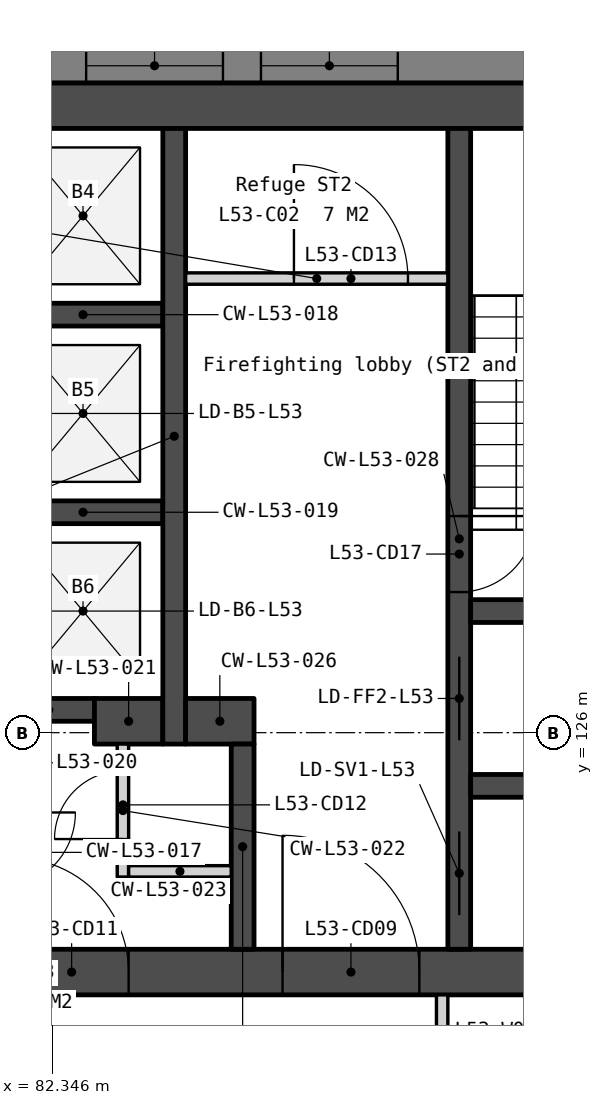
"""IFC4 building model, lengths in metres.
Left out: names, types, materials, properties, quantities, classifications, styles, units other than length and angle.
Written with IfcOpenShell. Run it as: python <this file> out.ifc"""

import sys

from ifc_helpers import new_model, si_unit, direction, frame, frame_2d, origin, place, context, subcontext, project, spatial, polyline, rectangle, outline, extrude, element, fill, save


model = new_model("IFC4")
c1 = context("Model", 3, precision=1e-05, world=origin(), true_north=direction((0.0, 1.0)))
c2 = subcontext(c1, "Body", "Model", "MODEL_VIEW")
j1 = project(units=[si_unit("LENGTHUNIT", "METRE"), si_unit("PLANEANGLEUNIT", "RADIAN")], contexts=[c1])
p1 = place(None, origin())
s1 = spatial("IfcSite", under=j1, at=p1, CompositionType="ELEMENT")
p2 = place(p1, origin())
s2 = spatial("IfcBuilding", under=s1, at=p2, CompositionType="ELEMENT")
p3 = place(p2, frame((0.0, 0.0, 211.4)))
s3 = spatial("IfcBuildingStorey", under=s2, at=p3, CompositionType="ELEMENT", Elevation=211.4)
p4 = place(p3, frame((69.0, 134.25, 0.0), z_axis=(0.0, 0.0, 1.0), x_axis=(1.0, 0.0, 0.0)))
e1 = element("IfcWall", 1, at=p4, inside=s3, PredefinedType="SOLIDWALL", context=c2, shape_type="SweptSolid", body=[
    extrude(rectangle(XDim=22.0, YDim=0.6, at=frame_2d((11.0, 0.0))), origin(), (0.0, 0.0, 1.0), 3.75),
])
p5 = place(p3, frame((69.0, 122.85, 0.0), z_axis=(0.0, 0.0, 1.0), x_axis=(1.0, 0.0, 0.0)))
e2 = element("IfcWall", 2, at=p5, inside=s3, PredefinedType="SOLIDWALL", context=c2, shape_type="SweptSolid", body=[
    extrude(rectangle(XDim=22.0, YDim=0.6, at=frame_2d((11.0, 0.0))), origin(), (0.0, 0.0, 1.0), 3.75),
])
p6 = place(p5, frame((16.375, 0.0, 0.0)))
e3 = element("IfcOpeningElement", 3, at=p6, cuts=e2, PredefinedType="OPENING", context=c2, shape_type="SweptSolid", body=[
    extrude(rectangle(XDim=1.8, YDim=2.1, at=frame_2d((0.9, 1.05))), frame((0.0, 0.31, 0.0), z_axis=(0.0, -1.0, 0.0), x_axis=(1.0, 0.0, 0.0)), (0.0, 0.0, 1.0), 0.62),
])
p7 = place(p5, frame((3.825, 0.0, 0.0)))
e4 = element("IfcOpeningElement", 4, at=p7, cuts=e2, PredefinedType="OPENING", context=c2, shape_type="SweptSolid", body=[
    extrude(rectangle(XDim=1.8, YDim=2.1, at=frame_2d((0.9, 1.05))), frame((0.0, 0.31, 0.0), z_axis=(0.0, -1.0, 0.0), x_axis=(1.0, 0.0, 0.0)), (0.0, 0.0, 1.0), 0.62),
])
p8 = place(p5, frame((12.85, 0.0, 0.0)))
e5 = element("IfcOpeningElement", 5, at=p8, cuts=e2, PredefinedType="OPENING", context=c2, shape_type="SweptSolid", body=[
    extrude(rectangle(XDim=1.5, YDim=2.1, at=frame_2d((0.75, 1.05))), frame((0.0, 0.31, 0.0), z_axis=(0.0, -1.0, 0.0), x_axis=(1.0, 0.0, 0.0)), (0.0, 0.0, 1.0), 0.62),
])
for number, where, z_axis, x_axis in (
    (6, (81.7, 131.5, 0.0), (0.0, 0.0, 1.0), (1.0, 0.0, 0.0)),
    (7, (81.7, 128.9, 0.0), (0.0, 0.0, 1.0), (1.0, 0.0, 0.0)),
):
    element("IfcWall", number, at=place(p3, frame(where, z_axis=z_axis, x_axis=x_axis)), inside=s3, PredefinedType="SOLIDWALL", context=c2, shape_type="SweptSolid", body=[
        extrude(rectangle(XDim=2.1, YDim=0.3, at=frame_2d((1.05, 0.0))), origin(), (0.0, 0.0, 1.0), 3.75),
    ])
p9 = place(p3, frame((81.7, 126.3, 0.0), z_axis=(0.0, 0.0, 1.0), x_axis=(1.0, 0.0, 0.0)))
e8 = element("IfcWall", 8, at=p9, inside=s3, PredefinedType="SOLIDWALL", context=c2, shape_type="SweptSolid", body=[
    extrude(rectangle(XDim=1.2, YDim=0.3, at=frame_2d((0.6, 0.0))), origin(), (0.0, 0.0, 1.0), 3.75),
])
p10 = place(p3, frame((82.9, 126.15, 0.0), z_axis=(0.0, 0.0, 1.0), x_axis=(1.0, 0.0, 0.0)))
e9 = element("IfcWall", 9, at=p10, inside=s3, PredefinedType="SOLIDWALL", context=c2, shape_type="SweptSolid", body=[
    extrude(rectangle(XDim=0.9, YDim=0.6, at=frame_2d((0.45, 0.0))), origin(), (0.0, 0.0, 1.0), 3.75),
])
p11 = place(p3, frame((83.275, 125.85, 0.0), z_axis=(0.0, 0.0, 1.0), x_axis=(0.0, -1.0, 0.0)))
e10 = element("IfcWall", 10, at=p11, inside=s3, PredefinedType="PARTITIONING", context=c2, shape_type="SweptSolid", body=[
    extrude(rectangle(XDim=1.75, YDim=0.15, at=frame_2d((0.875, 0.0))), origin(), (0.0, 0.0, 1.0), 3.75),
])
p12 = place(p11, frame((0.35, 0.0, 0.0)))
e11 = element("IfcOpeningElement", 11, at=p12, cuts=e10, PredefinedType="OPENING", context=c2, shape_type="SweptSolid", body=[
    extrude(rectangle(XDim=0.9, YDim=2.1, at=frame_2d((0.45, 1.05))), frame((0.0, 0.085, 0.0), z_axis=(0.0, -1.0, 0.0), x_axis=(1.0, 0.0, 0.0)), (0.0, 0.0, 1.0), 0.17),
])
p13 = place(p3, frame((83.35, 124.175, 0.0), z_axis=(0.0, 0.0, 1.0), x_axis=(1.0, 0.0, 0.0)))
e12 = element("IfcWall", 12, at=p13, inside=s3, PredefinedType="PARTITIONING", context=c2, shape_type="SweptSolid", body=[
    extrude(rectangle(XDim=1.35, YDim=0.15, at=frame_2d((0.675, 0.0))), origin(), (0.0, 0.0, 1.0), 3.75),
])
p14 = place(p3, frame((83.95, 133.95, 0.0), z_axis=(0.0, 0.0, 1.0), x_axis=(0.0, -1.0, 0.0)))
e13 = element("IfcWall", 13, at=p14, inside=s3, PredefinedType="SOLIDWALL", context=c2, shape_type="SweptSolid", body=[
    extrude(rectangle(XDim=8.1, YDim=0.3, at=frame_2d((4.05, 0.0))), origin(), (0.0, 0.0, 1.0), 3.75),
])
p15 = place(p3, frame((84.1, 131.975, 0.0), z_axis=(0.0, 0.0, 1.0), x_axis=(1.0, 0.0, 0.0)))
e14 = element("IfcWall", 14, at=p15, inside=s3, PredefinedType="PARTITIONING", context=c2, shape_type="SweptSolid", body=[
    extrude(rectangle(XDim=3.45, YDim=0.15, at=frame_2d((1.725, 0.0))), origin(), (0.0, 0.0, 1.0), 3.75),
])
p16 = place(p15, frame((1.425, 0.0, 0.0)))
e15 = element("IfcOpeningElement", 15, at=p16, cuts=e14, PredefinedType="OPENING", context=c2, shape_type="SweptSolid", body=[
    extrude(rectangle(XDim=1.5, YDim=2.1, at=frame_2d((0.75, 1.05))), frame((0.0, 0.085, 0.0), z_axis=(0.0, -1.0, 0.0), x_axis=(1.0, 0.0, 0.0)), (0.0, 0.0, 1.0), 0.17),
])
p17 = place(p3, frame((84.1, 126.15, 0.0), z_axis=(0.0, 0.0, 1.0), x_axis=(1.0, 0.0, 0.0)))
e16 = element("IfcWall", 16, at=p17, inside=s3, PredefinedType="SOLIDWALL", context=c2, shape_type="SweptSolid", body=[
    extrude(rectangle(XDim=0.9, YDim=0.6, at=frame_2d((0.45, 0.0))), origin(), (0.0, 0.0, 1.0), 3.75),
])
p18 = place(p3, frame((84.85, 125.85, 0.0), z_axis=(0.0, 0.0, 1.0), x_axis=(0.0, -1.0, 0.0)))
e17 = element("IfcWall", 17, at=p18, inside=s3, PredefinedType="SOLIDWALL", context=c2, shape_type="SweptSolid", body=[
    extrude(rectangle(XDim=2.7, YDim=0.3, at=frame_2d((1.35, 0.0))), origin(), (0.0, 0.0, 1.0), 3.75),
])
p19 = place(p3, frame((87.7, 133.95, 0.0), z_axis=(0.0, 0.0, 1.0), x_axis=(0.0, -1.0, 0.0)))
e18 = element("IfcWall", 18, at=p19, inside=s3, PredefinedType="SOLIDWALL", context=c2, shape_type="SweptSolid", body=[
    extrude(rectangle(XDim=10.8, YDim=0.3, at=frame_2d((5.4, 0.0))), origin(), (0.0, 0.0, 1.0), 3.75),
])
p20 = place(p19, frame((6.95, 0.0, 0.0)))
e19 = element("IfcOpeningElement", 19, at=p20, cuts=e18, PredefinedType="OPENING", context=c2, shape_type="SweptSolid", body=[
    extrude(rectangle(XDim=1.1, YDim=2.1, at=frame_2d((0.55, 1.05))), frame((0.0, 0.16, 0.0), z_axis=(0.0, -1.0, 0.0), x_axis=(1.0, 0.0, 0.0)), (0.0, 0.0, 1.0), 0.32),
])
p21 = place(p19, frame((5.1, 0.0, 0.0)))
e20 = element("IfcOpeningElement", 20, at=p21, cuts=e18, PredefinedType="OPENING", context=c2, shape_type="SweptSolid", body=[
    extrude(rectangle(XDim=1.0, YDim=2.1, at=frame_2d((0.5, 1.05))), frame((0.0, 0.16, 0.0), z_axis=(0.0, -1.0, 0.0), x_axis=(1.0, 0.0, 0.0)), (0.0, 0.0, 1.0), 0.32),
])
p22 = place(p19, frame((9.25, 0.0, 0.0)))
e21 = element("IfcOpeningElement", 21, at=p22, cuts=e18, PredefinedType="OPENING", context=c2, shape_type="SweptSolid", body=[
    extrude(rectangle(XDim=1.1, YDim=2.1, at=frame_2d((0.55, 1.05))), frame((0.0, 0.16, 0.0), z_axis=(0.0, -1.0, 0.0), x_axis=(1.0, 0.0, 0.0)), (0.0, 0.0, 1.0), 0.32),
])
for number, where, z_axis, x_axis in (
    (22, (87.85, 127.6, 0.0), (0.0, 0.0, 1.0), (1.0, 0.0, 0.0)),
    (23, (87.85, 125.3, 0.0), (0.0, 0.0, 1.0), (1.0, 0.0, 0.0)),
):
    element("IfcWall", number, at=place(p3, frame(where, z_axis=z_axis, x_axis=x_axis)), inside=s3, PredefinedType="SOLIDWALL", context=c2, shape_type="SweptSolid", body=[
        extrude(rectangle(XDim=2.55, YDim=0.3, at=frame_2d((1.275, 0.0))), origin(), (0.0, 0.0, 1.0), 3.75),
    ])
p23 = place(p3, frame((99.365, 134.775, -0.15), z_axis=(0.0, 0.0, 1.0), x_axis=(-1.0, 0.0, 0.0)))
e24 = element("IfcWall", 24, at=p23, inside=s3, PredefinedType="SOLIDWALL", context=c2, shape_type="SweptSolid", body=[
    extrude(outline(polyline([(38.729, 0.0), (38.729, 3.9), (0.0, 3.9), (0.0, 0.0), (38.729, 0.0)])), frame((0.0, 0.225, 0.0), z_axis=(0.0, -1.0, 0.0), x_axis=(1.0, 0.0, 0.0)), (0.0, 0.0, 1.0), 0.45),
])
p24 = place(p23, frame((2.791, 0.0, 0.95)))
e25 = element("IfcOpeningElement", 25, at=p24, cuts=e24, PredefinedType="OPENING", context=c2, shape_type="SweptSolid", body=[
    extrude(rectangle(XDim=1.8, YDim=2.2, at=frame_2d((0.9, 1.1))), frame((0.0, 0.235, 0.0), z_axis=(0.0, -1.0, 0.0), x_axis=(1.0, 0.0, 0.0)), (0.0, 0.0, 1.0), 0.47),
])
p25 = place(p23, frame((5.091, 0.0, 0.95)))
e26 = element("IfcOpeningElement", 26, at=p25, cuts=e24, PredefinedType="OPENING", context=c2, shape_type="SweptSolid", body=[
    extrude(rectangle(XDim=1.8, YDim=2.2, at=frame_2d((0.9, 1.1))), frame((0.0, 0.235, 0.0), z_axis=(0.0, -1.0, 0.0), x_axis=(1.0, 0.0, 0.0)), (0.0, 0.0, 1.0), 0.47),
])
p26 = place(p23, frame((12.473, 0.0, 0.95)))
e27 = element("IfcOpeningElement", 27, at=p26, cuts=e24, PredefinedType="OPENING", context=c2, shape_type="SweptSolid", body=[
    extrude(rectangle(XDim=1.8, YDim=2.2, at=frame_2d((0.9, 1.1))), frame((0.0, 0.235, 0.0), z_axis=(0.0, -1.0, 0.0), x_axis=(1.0, 0.0, 0.0)), (0.0, 0.0, 1.0), 0.47),
])
p27 = place(p23, frame((14.773, 0.0, 0.95)))
e28 = element("IfcOpeningElement", 28, at=p27, cuts=e24, PredefinedType="OPENING", context=c2, shape_type="SweptSolid", body=[
    extrude(rectangle(XDim=1.8, YDim=2.2, at=frame_2d((0.9, 1.1))), frame((0.0, 0.235, 0.0), z_axis=(0.0, -1.0, 0.0), x_axis=(1.0, 0.0, 0.0)), (0.0, 0.0, 1.0), 0.47),
])
p28 = place(p23, frame((22.156, 0.0, 0.95)))
e29 = element("IfcOpeningElement", 29, at=p28, cuts=e24, PredefinedType="OPENING", context=c2, shape_type="SweptSolid", body=[
    extrude(rectangle(XDim=1.8, YDim=2.2, at=frame_2d((0.9, 1.1))), frame((0.0, 0.235, 0.0), z_axis=(0.0, -1.0, 0.0), x_axis=(1.0, 0.0, 0.0)), (0.0, 0.0, 1.0), 0.47),
])
p29 = place(p23, frame((24.456, 0.0, 0.95)))
e30 = element("IfcOpeningElement", 30, at=p29, cuts=e24, PredefinedType="OPENING", context=c2, shape_type="SweptSolid", body=[
    extrude(rectangle(XDim=1.8, YDim=2.2, at=frame_2d((0.9, 1.1))), frame((0.0, 0.235, 0.0), z_axis=(0.0, -1.0, 0.0), x_axis=(1.0, 0.0, 0.0)), (0.0, 0.0, 1.0), 0.47),
])
p30 = place(p23, frame((31.838, 0.0, 0.95)))
e31 = element("IfcOpeningElement", 31, at=p30, cuts=e24, PredefinedType="OPENING", context=c2, shape_type="SweptSolid", body=[
    extrude(rectangle(XDim=1.8, YDim=2.2, at=frame_2d((0.9, 1.1))), frame((0.0, 0.235, 0.0), z_axis=(0.0, -1.0, 0.0), x_axis=(1.0, 0.0, 0.0)), (0.0, 0.0, 1.0), 0.47),
])
p31 = place(p23, frame((34.138, 0.0, 0.95)))
e32 = element("IfcOpeningElement", 32, at=p31, cuts=e24, PredefinedType="OPENING", context=c2, shape_type="SweptSolid", body=[
    extrude(rectangle(XDim=1.8, YDim=2.2, at=frame_2d((0.9, 1.1))), frame((0.0, 0.235, 0.0), z_axis=(0.0, -1.0, 0.0), x_axis=(1.0, 0.0, 0.0)), (0.0, 0.0, 1.0), 0.47),
])
p32 = place(p3, frame((81.505, 98.627, -0.15), z_axis=(0.0, 0.0, 1.0), x_axis=(0.500002199942, 0.866024133644, 0.0)))
e33 = element("IfcWall", 33, at=p32, inside=s3, PredefinedType="SOLIDWALL", context=c2, shape_type="SweptSolid", body=[
    extrude(outline(polyline([(38.729, 0.0), (38.729, 3.9), (0.0, 3.9), (0.0, 0.0), (38.729, 0.0)])), frame((0.0, 0.225, 0.0), z_axis=(0.0, -1.0, 0.0), x_axis=(1.0, 0.0, 0.0)), (0.0, 0.0, 1.0), 0.45),
])
p33 = place(p32, frame((2.791, 0.0, 0.95)))
e34 = element("IfcOpeningElement", 34, at=p33, cuts=e33, PredefinedType="OPENING", context=c2, shape_type="SweptSolid", body=[
    extrude(rectangle(XDim=1.8, YDim=2.2, at=frame_2d((0.9, 1.1))), frame((0.0, 0.235, 0.0), z_axis=(0.0, -1.0, 0.0), x_axis=(1.0, 0.0, 0.0)), (0.0, 0.0, 1.0), 0.47),
])
p34 = place(p32, frame((5.091, 0.0, 0.95)))
e35 = element("IfcOpeningElement", 35, at=p34, cuts=e33, PredefinedType="OPENING", context=c2, shape_type="SweptSolid", body=[
    extrude(rectangle(XDim=1.8, YDim=2.2, at=frame_2d((0.9, 1.1))), frame((0.0, 0.235, 0.0), z_axis=(0.0, -1.0, 0.0), x_axis=(1.0, 0.0, 0.0)), (0.0, 0.0, 1.0), 0.47),
])
p35 = place(p32, frame((12.473, 0.0, 0.95)))
e36 = element("IfcOpeningElement", 36, at=p35, cuts=e33, PredefinedType="OPENING", context=c2, shape_type="SweptSolid", body=[
    extrude(rectangle(XDim=1.8, YDim=2.2, at=frame_2d((0.9, 1.1))), frame((0.0, 0.235, 0.0), z_axis=(0.0, -1.0, 0.0), x_axis=(1.0, 0.0, 0.0)), (0.0, 0.0, 1.0), 0.47),
])
p36 = place(p32, frame((14.773, 0.0, 0.95)))
e37 = element("IfcOpeningElement", 37, at=p36, cuts=e33, PredefinedType="OPENING", context=c2, shape_type="SweptSolid", body=[
    extrude(rectangle(XDim=1.8, YDim=2.2, at=frame_2d((0.9, 1.1))), frame((0.0, 0.235, 0.0), z_axis=(0.0, -1.0, 0.0), x_axis=(1.0, 0.0, 0.0)), (0.0, 0.0, 1.0), 0.47),
])
p37 = place(p32, frame((22.156, 0.0, 0.95)))
e38 = element("IfcOpeningElement", 38, at=p37, cuts=e33, PredefinedType="OPENING", context=c2, shape_type="SweptSolid", body=[
    extrude(rectangle(XDim=1.8, YDim=2.2, at=frame_2d((0.9, 1.1))), frame((0.0, 0.235, 0.0), z_axis=(0.0, -1.0, 0.0), x_axis=(1.0, 0.0, 0.0)), (0.0, 0.0, 1.0), 0.47),
])
p38 = place(p32, frame((24.456, 0.0, 0.95)))
e39 = element("IfcOpeningElement", 39, at=p38, cuts=e33, PredefinedType="OPENING", context=c2, shape_type="SweptSolid", body=[
    extrude(rectangle(XDim=1.8, YDim=2.2, at=frame_2d((0.9, 1.1))), frame((0.0, 0.235, 0.0), z_axis=(0.0, -1.0, 0.0), x_axis=(1.0, 0.0, 0.0)), (0.0, 0.0, 1.0), 0.47),
])
p39 = place(p32, frame((31.838, 0.0, 0.95)))
e40 = element("IfcOpeningElement", 40, at=p39, cuts=e33, PredefinedType="OPENING", context=c2, shape_type="SweptSolid", body=[
    extrude(rectangle(XDim=1.8, YDim=2.2, at=frame_2d((0.9, 1.1))), frame((0.0, 0.235, 0.0), z_axis=(0.0, -1.0, 0.0), x_axis=(1.0, 0.0, 0.0)), (0.0, 0.0, 1.0), 0.47),
])
p40 = place(p32, frame((34.138, 0.0, 0.95)))
e41 = element("IfcOpeningElement", 41, at=p40, cuts=e33, PredefinedType="OPENING", context=c2, shape_type="SweptSolid", body=[
    extrude(rectangle(XDim=1.8, YDim=2.2, at=frame_2d((0.9, 1.1))), frame((0.0, 0.235, 0.0), z_axis=(0.0, -1.0, 0.0), x_axis=(1.0, 0.0, 0.0)), (0.0, 0.0, 1.0), 0.47),
])
p41 = place(p3, frame((87.475, 120.05, 0.0), z_axis=(0.0, 0.0, 1.0), x_axis=(0.0, 1.0, 0.0)))
e42 = element("IfcWall", 42, at=p41, inside=s3, PredefinedType="PARTITIONING", context=c2, shape_type="SweptSolid", body=[
    extrude(rectangle(XDim=2.5, YDim=0.15, at=frame_2d((1.25, 0.0))), origin(), (0.0, 0.0, 1.0), 3.75),
])
p42 = place(p41, frame((0.75, 0.0, 0.0)))
e43 = element("IfcOpeningElement", 43, at=p42, cuts=e42, PredefinedType="OPENING", context=c2, shape_type="SweptSolid", body=[
    extrude(rectangle(XDim=1.0, YDim=2.1, at=frame_2d((0.5, 1.05))), frame((0.0, 0.085, 0.0), z_axis=(0.0, -1.0, 0.0), x_axis=(1.0, 0.0, 0.0)), (0.0, 0.0, 1.0), 0.17),
])
p43 = place(p20, origin())
e44 = element("IfcDoor", 44, at=p43, inside=s3, OperationType="SLIDING_TO_LEFT", PredefinedType="DOOR", context=c2, shape_type="SweptSolid", body=[
    extrude(rectangle(XDim=1.1, YDim=2.1, at=frame_2d((0.55, 1.05))), frame((0.0, 0.025, 0.0), z_axis=(0.0, -1.0, 0.0), x_axis=(1.0, 0.0, 0.0)), (0.0, 0.0, 1.0), 0.05),
])
fill(e19, e44)
p44 = place(p6, origin())
e45 = element("IfcDoor", 45, at=p44, inside=s3, OperationType="DOUBLE_DOOR_DOUBLE_SWING", PredefinedType="DOOR", context=c2, shape_type="SweptSolid", body=[
    extrude(rectangle(XDim=1.8, YDim=2.1, at=frame_2d((0.9, 1.05))), frame((0.0, 0.025, 0.0), z_axis=(0.0, -1.0, 0.0), x_axis=(1.0, 0.0, 0.0)), (0.0, 0.0, 1.0), 0.05),
])
fill(e3, e45)
p45 = place(p8, origin())
e46 = element("IfcDoor", 46, at=p45, inside=s3, OperationType="DOUBLE_DOOR_DOUBLE_SWING", PredefinedType="DOOR", context=c2, shape_type="SweptSolid", body=[
    extrude(rectangle(XDim=1.5, YDim=2.1, at=frame_2d((0.75, 1.05))), frame((0.0, 0.025, 0.0), z_axis=(0.0, -1.0, 0.0), x_axis=(1.0, 0.0, 0.0)), (0.0, 0.0, 1.0), 0.05),
])
fill(e5, e46)
p46 = place(p12, origin())
e47 = element("IfcDoor", 47, at=p46, inside=s3, OperationType="SINGLE_SWING_RIGHT", PredefinedType="DOOR", context=c2, shape_type="SweptSolid", body=[
    extrude(rectangle(XDim=0.9, YDim=2.1, at=frame_2d((0.45, 1.05))), frame((0.0, 0.025, 0.0), z_axis=(0.0, -1.0, 0.0), x_axis=(1.0, 0.0, 0.0)), (0.0, 0.0, 1.0), 0.05),
])
fill(e11, e47)
p47 = place(p16, origin())
e48 = element("IfcDoor", 48, at=p47, inside=s3, OperationType="DOUBLE_DOOR_DOUBLE_SWING", PredefinedType="DOOR", context=c2, shape_type="SweptSolid", body=[
    extrude(rectangle(XDim=1.5, YDim=2.1, at=frame_2d((0.75, 1.05))), frame((0.0, 0.025, 0.0), z_axis=(0.0, -1.0, 0.0), x_axis=(1.0, 0.0, 0.0)), (0.0, 0.0, 1.0), 0.05),
])
fill(e15, e48)
p48 = place(p21, origin())
e49 = element("IfcDoor", 49, at=p48, inside=s3, OperationType="SINGLE_SWING_LEFT", PredefinedType="DOOR", context=c2, shape_type="SweptSolid", body=[
    extrude(rectangle(XDim=1.0, YDim=2.1, at=frame_2d((0.5, 1.05))), frame((0.0, 0.025, 0.0), z_axis=(0.0, -1.0, 0.0), x_axis=(1.0, 0.0, 0.0)), (0.0, 0.0, 1.0), 0.05),
])
fill(e20, e49)
p49 = place(p22, origin())
e50 = element("IfcDoor", 50, at=p49, inside=s3, OperationType="SLIDING_TO_LEFT", PredefinedType="DOOR", context=c2, shape_type="SweptSolid", body=[
    extrude(rectangle(XDim=1.1, YDim=2.1, at=frame_2d((0.55, 1.05))), frame((0.0, 0.025, 0.0), z_axis=(0.0, -1.0, 0.0), x_axis=(1.0, 0.0, 0.0)), (0.0, 0.0, 1.0), 0.05),
])
fill(e21, e50)
p50 = place(p26, origin())
e51 = element("IfcWindow", 51, at=p50, inside=s3, PartitioningType="SINGLE_PANEL", PredefinedType="WINDOW", context=c2, shape_type="SweptSolid", body=[
    extrude(rectangle(XDim=1.8, YDim=2.2, at=frame_2d((0.9, 1.1))), frame((0.0, 0.03, 0.0), z_axis=(0.0, -1.0, 0.0), x_axis=(1.0, 0.0, 0.0)), (0.0, 0.0, 1.0), 0.06),
])
fill(e27, e51)
p51 = place(p27, origin())
e52 = element("IfcWindow", 52, at=p51, inside=s3, PartitioningType="SINGLE_PANEL", PredefinedType="WINDOW", context=c2, shape_type="SweptSolid", body=[
    extrude(rectangle(XDim=1.8, YDim=2.2, at=frame_2d((0.9, 1.1))), frame((0.0, 0.03, 0.0), z_axis=(0.0, -1.0, 0.0), x_axis=(1.0, 0.0, 0.0)), (0.0, 0.0, 1.0), 0.06),
])
fill(e28, e52)
save(model, sys.argv[1])
